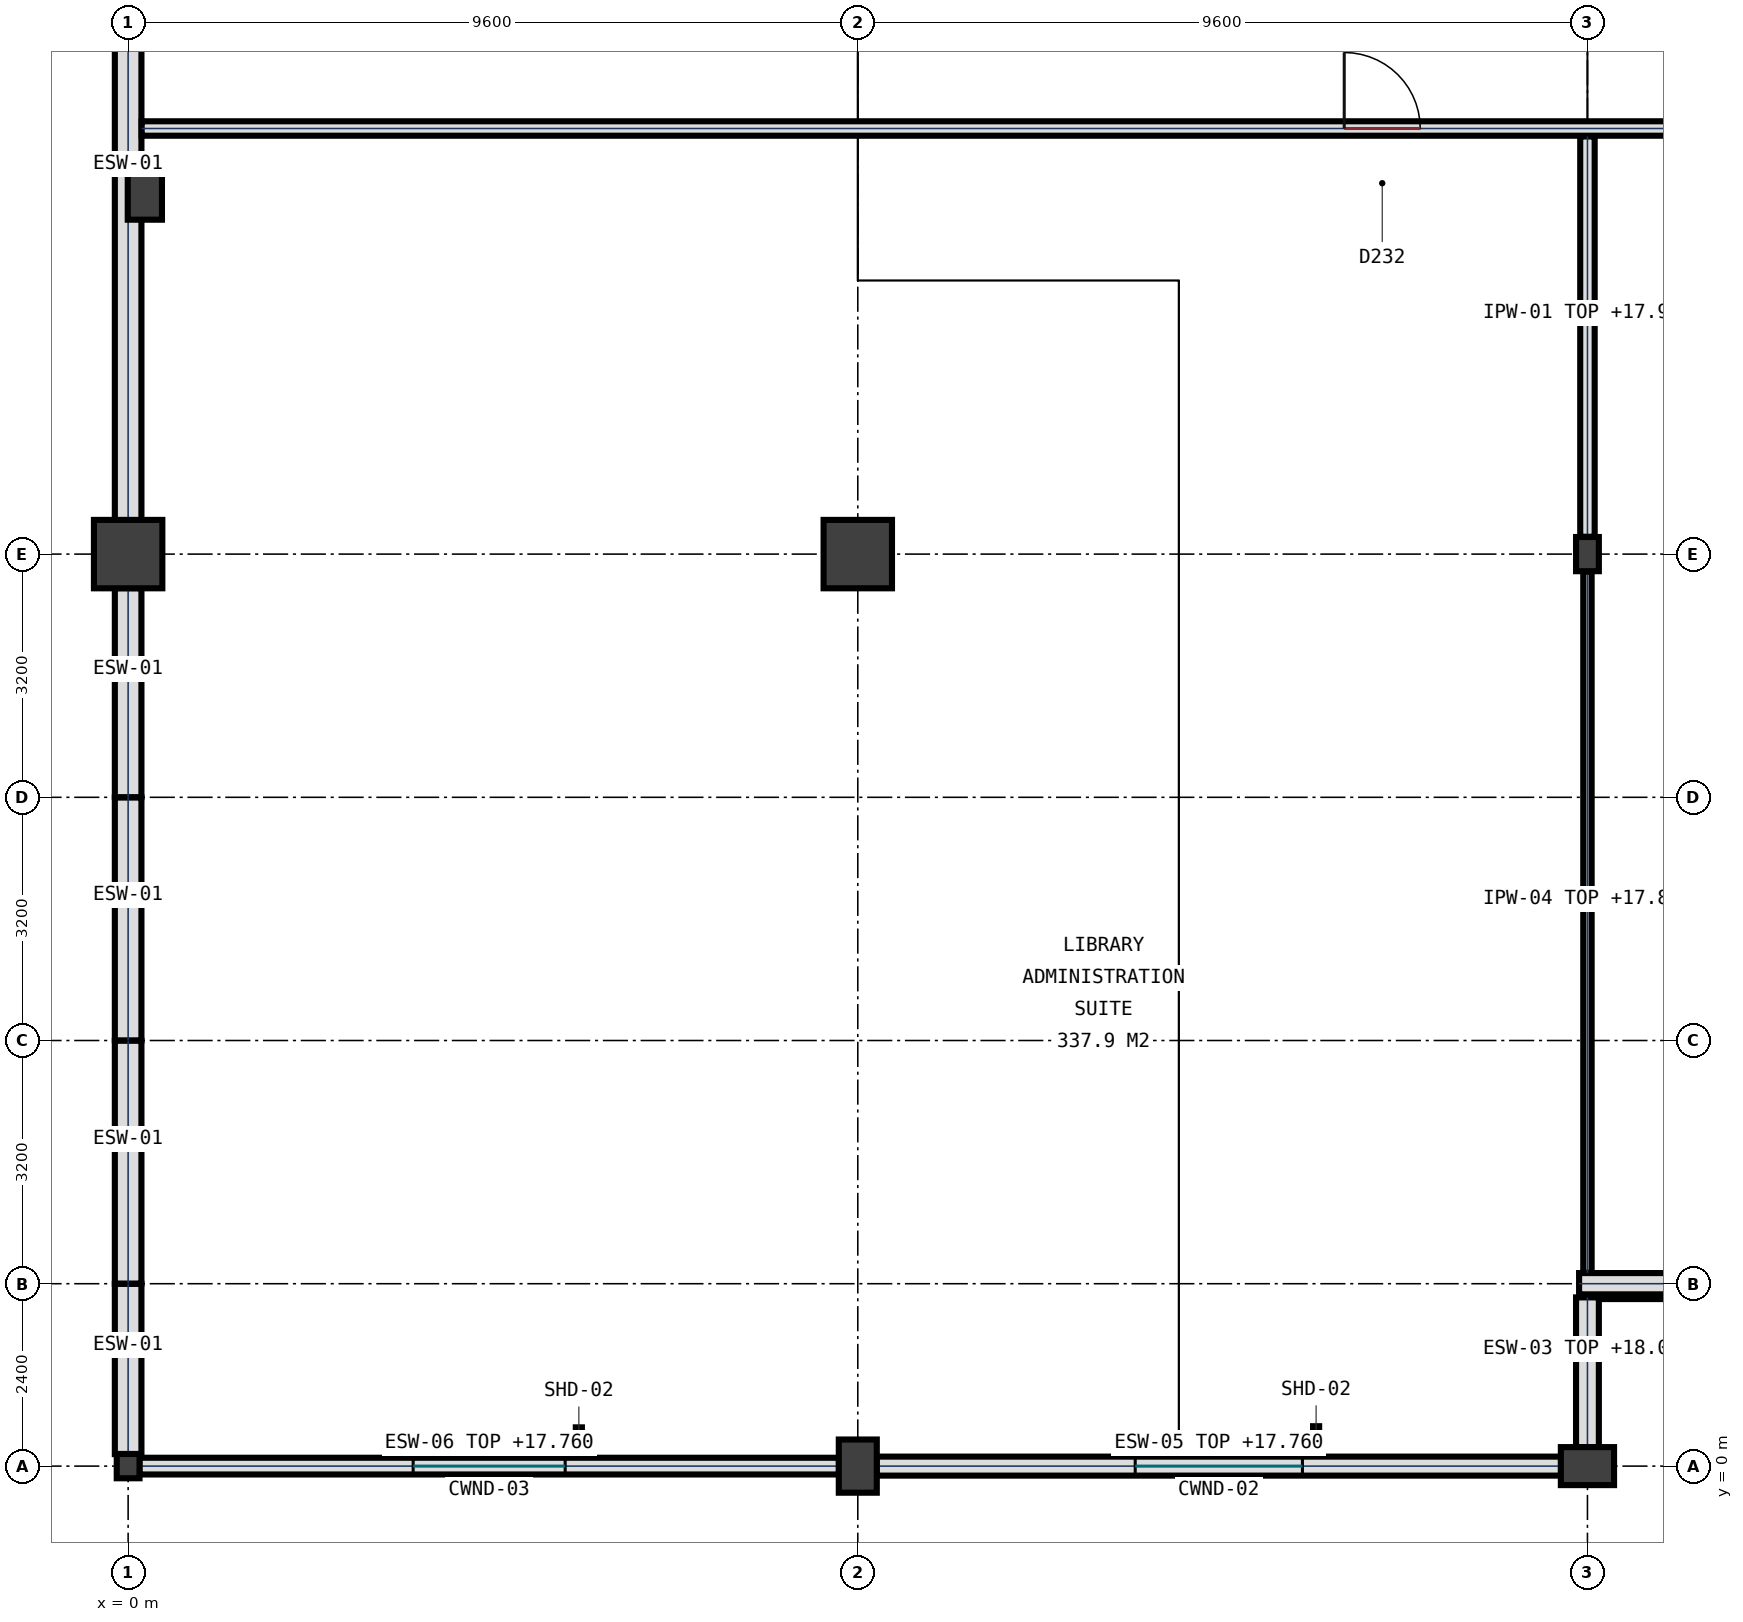
"""IFC4 building model, lengths in metres.
Left out: names, types, materials, properties, quantities, classifications, styles, units other than length and angle.
Written with IfcOpenShell. Run it as: python <this file> out.ifc"""

import sys

from ifc_helpers import new_model, si_unit, direction, frame, frame_2d, origin, origin_with_axes, origin_2d, place, context, subcontext, project, spatial, polyline, rectangle, circle, i_section, outline, extrude, element, fill, save


model = new_model("IFC4")
c1 = context("Model", 3, precision=1e-05, world=origin(), true_north=direction((0.0, 1.0)))
c2 = subcontext(c1, "Body", "Model", "MODEL_VIEW")
j1 = project(units=[si_unit("LENGTHUNIT", "METRE"), si_unit("PLANEANGLEUNIT", "RADIAN")], contexts=[c1])
p1 = place(None, origin())
s1 = spatial("IfcSite", under=j1, at=p1, CompositionType="ELEMENT")
p2 = place(p1, origin())
s2 = spatial("IfcBuilding", under=s1, at=p2, CompositionType="ELEMENT")
p3 = place(p2, frame((0.0, 0.0, 14.4)))
s3 = spatial("IfcBuildingStorey", under=s2, at=p3, CompositionType="ELEMENT", Elevation=14.4)
p4 = place(p3, origin_with_axes())
e1 = element("IfcColumn", 1, at=p4, inside=s3, PredefinedType="COLUMN", context=c2, shape_type="SweptSolid", body=[
    extrude(i_section(OverallWidth=0.3, OverallDepth=0.32, WebThickness=0.011, FlangeThickness=0.021, FilletRadius=0.027, at=origin_2d()), origin(), (0.0, 0.0, 1.0), 4.5),
])
p5 = place(p3, frame((0.0, 12.0, 0.0), z_axis=(0.0, 0.0, 1.0), x_axis=(1.0, 0.0, 0.0)))
e2 = element("IfcColumn", 2, at=p5, inside=s3, PredefinedType="COLUMN", context=c2, shape_type="SweptSolid", body=[
    extrude(circle(Radius=0.45, at=origin_2d()), origin(), (0.0, 0.0, 1.0), 4.5),
])
p6 = place(p3, frame((9.6, 0.0, 0.0), z_axis=(0.0, 0.0, 1.0), x_axis=(0.0, 1.0, 0.0)))
e3 = element("IfcColumn", 3, at=p6, inside=s3, PredefinedType="COLUMN", context=c2, shape_type="SweptSolid", body=[
    extrude(rectangle(XDim=0.7, YDim=0.5, at=origin_2d()), origin(), (0.0, 0.0, 1.0), 4.5),
])
p7 = place(p3, frame((9.6, 12.0, 0.0), z_axis=(0.0, 0.0, 1.0), x_axis=(1.0, 0.0, 0.0)))
e4 = element("IfcColumn", 4, at=p7, inside=s3, PredefinedType="COLUMN", context=c2, shape_type="SweptSolid", body=[
    extrude(circle(Radius=0.45, at=origin_2d()), origin(), (0.0, 0.0, 1.0), 4.5),
])
p8 = place(p3, frame((19.2, 0.0, 0.0), z_axis=(0.0, 0.0, 1.0), x_axis=(1.0, 0.0, 0.0)))
e5 = element("IfcColumn", 5, at=p8, inside=s3, PredefinedType="COLUMN", context=c2, shape_type="SweptSolid", body=[
    extrude(rectangle(XDim=0.7, YDim=0.5, at=origin_2d()), origin(), (0.0, 0.0, 1.0), 4.5),
])
p9 = place(p3, frame((19.2, 12.0, 0.0), z_axis=(0.0, 0.0, 1.0), x_axis=(1.0, 0.0, 0.0)))
e6 = element("IfcColumn", 6, at=p9, inside=s3, PredefinedType="COLUMN", context=c2, shape_type="SweptSolid", body=[
    extrude(i_section(OverallWidth=0.3, OverallDepth=0.45, WebThickness=0.014, FlangeThickness=0.026, FilletRadius=0.027, at=origin_2d()), origin(), (0.0, 0.0, 1.0), 4.5),
])
p10 = place(p3, frame((0.22, 16.8, 0.0), z_axis=(0.0, 0.0, 1.0), x_axis=(1.0, 0.0, 0.0)))
e7 = element("IfcColumn", 7, at=p10, inside=s3, PredefinedType="PILASTER", context=c2, shape_type="SweptSolid", body=[
    extrude(rectangle(XDim=0.45, YDim=0.8, at=origin_2d()), origin(), (0.0, 0.0, 1.0), 4.5),
])
p11 = place(p3, frame((18.852, 0.0, 0.0), z_axis=(0.0, 0.0, 1.0), x_axis=(-1.0, 0.0, 0.0)))
e8 = element("IfcWall", 8, at=p11, inside=s3, PredefinedType="SOLIDWALL", context=c2, shape_type="SweptSolid", body=[
    extrude(rectangle(XDim=9.004, YDim=0.25, at=frame_2d((4.502, 0.0))), origin(), (0.0, 0.0, 1.0), 3.36),
])
p12 = place(p11, frame((3.402, 0.0, 0.95)))
e9 = element("IfcOpeningElement", 9, at=p12, cuts=e8, PredefinedType="OPENING", context=c2, shape_type="SweptSolid", body=[
    extrude(rectangle(XDim=2.2, YDim=1.55, at=frame_2d((1.1, 0.775))), frame((0.0, 0.135, 0.0), z_axis=(0.0, -1.0, 0.0), x_axis=(1.0, 0.0, 0.0)), (0.0, 0.0, 1.0), 0.27),
])
p13 = place(p3, frame((9.352, 0.0, 0.0), z_axis=(0.0, 0.0, 1.0), x_axis=(-1.0, 0.0, 0.0)))
e10 = element("IfcWall", 10, at=p13, inside=s3, PredefinedType="SOLIDWALL", context=c2, shape_type="SweptSolid", body=[
    extrude(rectangle(XDim=9.204, YDim=0.22, at=frame_2d((4.602, 0.0))), origin(), (0.0, 0.0, 1.0), 3.36),
])
p14 = place(p13, frame((3.602, 0.0, 0.95)))
e11 = element("IfcOpeningElement", 11, at=p14, cuts=e10, PredefinedType="OPENING", context=c2, shape_type="SweptSolid", body=[
    extrude(rectangle(XDim=2.0, YDim=1.55, at=frame_2d((1.0, 0.775))), frame((0.0, 0.12, 0.0), z_axis=(0.0, -1.0, 0.0), x_axis=(1.0, 0.0, 0.0)), (0.0, 0.0, 1.0), 0.24),
])
p15 = place(p3, frame((0.0, 0.158, 0.0), z_axis=(0.0, 0.0, 1.0), x_axis=(0.0, 1.0, 0.0)))
e12 = element("IfcWall", 12, at=p15, inside=s3, PredefinedType="SOLIDWALL", context=c2, shape_type="SweptSolid", body=[
    extrude(rectangle(XDim=2.24, YDim=0.35, at=frame_2d((1.12, 0.0))), origin(), (0.0, 0.0, 1.0), 4.26),
])
p16 = place(p3, frame((0.0, 2.402, 0.0), z_axis=(0.0, 0.0, 1.0), x_axis=(0.0, 1.0, 0.0)))
e13 = element("IfcWall", 13, at=p16, inside=s3, PredefinedType="SOLIDWALL", context=c2, shape_type="SweptSolid", body=[
    extrude(rectangle(XDim=3.196, YDim=0.35, at=frame_2d((1.598, 0.0))), origin(), (0.0, 0.0, 1.0), 4.26),
])
p17 = place(p3, frame((0.0, 5.602, 0.0), z_axis=(0.0, 0.0, 1.0), x_axis=(0.0, 1.0, 0.0)))
e14 = element("IfcWall", 14, at=p17, inside=s3, PredefinedType="SOLIDWALL", context=c2, shape_type="SweptSolid", body=[
    extrude(rectangle(XDim=3.196, YDim=0.35, at=frame_2d((1.598, 0.0))), origin(), (0.0, 0.0, 1.0), 4.26),
])
p18 = place(p3, frame((0.0, 8.802, 0.0), z_axis=(0.0, 0.0, 1.0), x_axis=(0.0, 1.0, 0.0)))
e15 = element("IfcWall", 15, at=p18, inside=s3, PredefinedType="SOLIDWALL", context=c2, shape_type="SweptSolid", body=[
    extrude(rectangle(XDim=2.75, YDim=0.35, at=frame_2d((1.375, 0.0))), origin(), (0.0, 0.0, 1.0), 4.26),
])
p19 = place(p3, frame((0.0, 12.448, 0.0), z_axis=(0.0, 0.0, 1.0), x_axis=(0.0, 1.0, 0.0)))
e16 = element("IfcWall", 16, at=p19, inside=s3, PredefinedType="SOLIDWALL", context=c2, shape_type="SweptSolid", body=[
    extrude(rectangle(XDim=8.754, YDim=0.35, at=frame_2d((4.377, 0.0))), origin(), (0.0, 0.0, 1.0), 4.24),
])
p20 = place(p3, frame((32.698, 2.4, 0.0), z_axis=(0.0, 0.0, 1.0), x_axis=(-1.0, 0.0, 0.0)))
e17 = element("IfcWall", 17, at=p20, inside=s3, PredefinedType="SOLIDWALL", context=c2, shape_type="SweptSolid", body=[
    extrude(rectangle(XDim=13.608, YDim=0.28, at=frame_2d((6.804, 0.0))), origin(), (0.0, 0.0, 1.0), 3.5),
])
p21 = place(p20, frame((4.304, 0.0, 1.1)))
e18 = element("IfcOpeningElement", 18, at=p21, cuts=e17, PredefinedType="OPENING", context=c2, shape_type="SweptSolid", body=[
    extrude(outline(polyline([(0.4, 0.8), (0.263, 0.776), (0.143, 0.707), (0.054, 0.6), (0.006, 0.469), (0.006, 0.331), (0.054, 0.2), (0.143, 0.094), (0.263, 0.024), (0.4, 0.0), (4.6, 0.0), (4.737, 0.024), (4.857, 0.094), (4.946, 0.2), (4.994, 0.331), (4.994, 0.469), (4.946, 0.6), (4.857, 0.707), (4.737, 0.776), (4.6, 0.8), (0.4, 0.8)])), frame((0.0, 0.15, 0.0), z_axis=(0.0, -1.0, 0.0), x_axis=(1.0, 0.0, 0.0)), (0.0, 0.0, 1.0), 0.3),
])
p22 = place(p3, frame((19.2, 2.22, 0.0), z_axis=(0.0, 0.0, 1.0), x_axis=(0.0, -1.0, 0.0)))
e19 = element("IfcWall", 19, at=p22, inside=s3, PredefinedType="SOLIDWALL", context=c2, shape_type="SweptSolid", body=[
    extrude(rectangle(XDim=1.972, YDim=0.3, at=frame_2d((0.986, 0.0))), origin(), (0.0, 0.0, 1.0), 3.65),
])
p23 = place(p3, frame((0.178, 17.6, 0.0), z_axis=(0.0, 0.0, 1.0), x_axis=(1.0, 0.0, 0.0)))
e20 = element("IfcWall", 20, at=p23, inside=s3, PredefinedType="PARTITIONING", context=c2, shape_type="SweptSolid", body=[
    extrude(rectangle(XDim=74.772, YDim=0.19, at=frame_2d((37.386, 0.0))), origin(), (0.0, 0.0, 1.0), 3.5),
])
p24 = place(p23, frame((15.822, 0.0, 0.0)))
e21 = element("IfcOpeningElement", 21, at=p24, cuts=e20, PredefinedType="OPENING", context=c2, shape_type="SweptSolid", body=[
    extrude(rectangle(XDim=1.0, YDim=2.2, at=frame_2d((0.5, 1.1))), frame((0.0, 0.105, 0.0), z_axis=(0.0, -1.0, 0.0), x_axis=(1.0, 0.0, 0.0)), (0.0, 0.0, 1.0), 0.21),
])
p25 = place(p23, frame((51.797, 0.0, 0.0)))
e22 = element("IfcOpeningElement", 22, at=p25, cuts=e20, PredefinedType="OPENING", context=c2, shape_type="SweptSolid", body=[
    extrude(rectangle(XDim=1.85, YDim=2.35, at=frame_2d((0.925, 1.175))), frame((0.0, 0.105, 0.0), z_axis=(0.0, -1.0, 0.0), x_axis=(1.0, 0.0, 0.0)), (0.0, 0.0, 1.0), 0.21),
])
p26 = place(p23, frame((68.522, 0.0, 0.0)))
e23 = element("IfcOpeningElement", 23, at=p26, cuts=e20, PredefinedType="OPENING", context=c2, shape_type="SweptSolid", body=[
    extrude(rectangle(XDim=1.0, YDim=2.2, at=frame_2d((0.5, 1.1))), frame((0.0, 0.105, 0.0), z_axis=(0.0, -1.0, 0.0), x_axis=(1.0, 0.0, 0.0)), (0.0, 0.0, 1.0), 0.21),
])
p27 = place(p3, frame((19.2, 2.543, 0.0), z_axis=(0.0, 0.0, 1.0), x_axis=(0.0, 1.0, 0.0)))
e24 = element("IfcWall", 24, at=p27, inside=s3, PredefinedType="PARTITIONING", context=c2, shape_type="SweptSolid", body=[
    extrude(rectangle(XDim=9.229, YDim=0.11, at=frame_2d((4.615, 0.0))), origin(), (0.0, 0.0, 1.0), 3.43),
])
p28 = place(p3, frame((19.2, 12.228, 0.0), z_axis=(0.0, 0.0, 1.0), x_axis=(0.0, 1.0, 0.0)))
e25 = element("IfcWall", 25, at=p28, inside=s3, PredefinedType="PARTITIONING", context=c2, shape_type="SweptSolid", body=[
    extrude(rectangle(XDim=5.267, YDim=0.19, at=frame_2d((2.634, 0.0))), origin(), (0.0, 0.0, 1.0), 3.55),
])
p29 = place(p12, origin())
e26 = element("IfcWindow", 26, at=p29, inside=s3, PartitioningType="SINGLE_PANEL", PredefinedType="WINDOW", context=c2, shape_type="SweptSolid", body=[
    extrude(rectangle(XDim=2.2, YDim=1.55, at=frame_2d((1.1, 0.775))), frame((0.0, 0.032, 0.0), z_axis=(0.0, -1.0, 0.0), x_axis=(1.0, 0.0, 0.0)), (0.0, 0.0, 1.0), 0.065),
])
fill(e9, e26)
p30 = place(p14, origin())
e27 = element("IfcWindow", 27, at=p30, inside=s3, PartitioningType="SINGLE_PANEL", PredefinedType="WINDOW", context=c2, shape_type="SweptSolid", body=[
    extrude(rectangle(XDim=2.0, YDim=1.55, at=frame_2d((1.0, 0.775))), frame((0.0, 0.032, 0.0), z_axis=(0.0, -1.0, 0.0), x_axis=(1.0, 0.0, 0.0)), (0.0, 0.0, 1.0), 0.065),
])
fill(e11, e27)
p31 = place(p24, origin())
e28 = element("IfcDoor", 28, at=p31, inside=s3, OperationType="SINGLE_SWING_LEFT", PredefinedType="DOOR", context=c2, shape_type="SweptSolid", body=[
    extrude(rectangle(XDim=1.0, YDim=2.2, at=frame_2d((0.5, 1.1))), frame((0.0, 0.032, 0.0), z_axis=(0.0, -1.0, 0.0), x_axis=(1.0, 0.0, 0.0)), (0.0, 0.0, 1.0), 0.065),
])
fill(e21, e28)
save(model, sys.argv[1])
